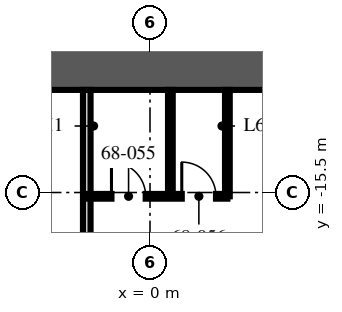
"""IFC4 building model, lengths in metres.
Left out: names, types, materials, properties, quantities, classifications, styles, units other than length and angle.
Written with IfcOpenShell. Run it as: python <this file> out.ifc"""

import sys

from ifc_helpers import new_model, si_unit, direction, frame, frame_2d, origin, place, context, subcontext, project, spatial, rectangle, extrude, element, fill, save


model = new_model("IFC4")
c1 = context("Model", 3, precision=1e-05, world=origin(), true_north=direction((0.0, 1.0)))
c2 = subcontext(c1, "Body", "Model", "MODEL_VIEW")
j1 = project(units=[si_unit("LENGTHUNIT", "METRE"), si_unit("PLANEANGLEUNIT", "RADIAN")], contexts=[c1])
p1 = place(None, origin())
s1 = spatial("IfcSite", under=j1, at=p1, CompositionType="ELEMENT")
p2 = place(p1, origin())
s2 = spatial("IfcBuilding", under=s1, at=p2, CompositionType="ELEMENT")
p3 = place(p2, frame((0.0, 0.0, 270.75)))
s3 = spatial("IfcBuildingStorey", under=s2, at=p3, CompositionType="ELEMENT", Elevation=270.75)
p4 = place(p3, frame((-15.5, -12.0, -0.25), z_axis=(0.0, 0.0, 1.0), x_axis=(1.0, 0.0, 0.0)))
e1 = element("IfcWall", 1, at=p4, inside=s3, PredefinedType="SHEAR", context=c2, shape_type="SweptSolid", body=[
    extrude(rectangle(XDim=31.0, YDim=1.6, at=frame_2d((15.5, 0.0))), origin(), (0.0, 0.0, 1.0), 3.75),
])
p5 = place(p3, frame((-1.664, -12.8, 0.0), z_axis=(0.0, 0.0, 1.0), x_axis=(0.0, -1.0, 0.0)))
e2 = element("IfcWall", 2, at=p5, inside=s3, PredefinedType="PARTITIONING", context=c2, shape_type="SweptSolid", body=[
    extrude(rectangle(XDim=12.65, YDim=0.2, at=frame_2d((6.325, 0.0))), origin(), (0.0, 0.0, 1.0), 2.81),
])
p6 = place(p3, frame((-1.664, -15.6, 0.0), z_axis=(0.0, 0.0, 1.0), x_axis=(1.0, 0.0, 0.0)))
e3 = element("IfcWall", 3, at=p6, inside=s3, PredefinedType="PARTITIONING", context=c2, shape_type="SweptSolid", body=[
    extrude(rectangle(XDim=3.7, YDim=0.125, at=frame_2d((1.85, 0.0))), origin(), (0.0, 0.0, 1.0), 2.6),
])
p7 = place(p6, frame((0.65, 0.0, 0.0)))
e4 = element("IfcOpeningElement", 4, at=p7, cuts=e3, PredefinedType="OPENING", context=c2, shape_type="SweptSolid", body=[
    extrude(rectangle(XDim=0.9, YDim=2.1, at=frame_2d((0.45, 1.05))), frame((0.0, 0.073, 0.0), z_axis=(0.0, -1.0, 0.0), x_axis=(1.0, 0.0, 0.0)), (0.0, 0.0, 1.0), 0.145),
])
p8 = place(p6, frame((2.5, 0.0, 0.0)))
e5 = element("IfcOpeningElement", 5, at=p8, cuts=e3, PredefinedType="OPENING", context=c2, shape_type="SweptSolid", body=[
    extrude(rectangle(XDim=0.9, YDim=2.1, at=frame_2d((0.45, 1.05))), frame((0.0, 0.073, 0.0), z_axis=(0.0, -1.0, 0.0), x_axis=(1.0, 0.0, 0.0)), (0.0, 0.0, 1.0), 0.145),
])
for number, where, z_axis, x_axis in (
    (6, (0.536, -12.8, 0.0), (0.0, 0.0, 1.0), (0.0, -1.0, 0.0)),
    (7, (2.036, -12.8, 0.0), (0.0, 0.0, 1.0), (0.0, -1.0, 0.0)),
):
    element("IfcWall", number, at=place(p3, frame(where, z_axis=z_axis, x_axis=x_axis)), inside=s3, PredefinedType="PARTITIONING", context=c2, shape_type="SweptSolid", body=[
        extrude(rectangle(XDim=2.8, YDim=0.125, at=frame_2d((1.4, 0.0))), origin(), (0.0, 0.0, 1.0), 3.5),
    ])
p9 = place(p7, origin())
e8 = element("IfcDoor", 8, at=p9, inside=s3, OperationType="SINGLE_SWING_LEFT", PredefinedType="DOOR", context=c2, shape_type="SweptSolid", body=[
    extrude(rectangle(XDim=0.9, YDim=2.1, at=frame_2d((0.45, 1.05))), frame((0.0, 0.025, 0.0), z_axis=(0.0, -1.0, 0.0), x_axis=(1.0, 0.0, 0.0)), (0.0, 0.0, 1.0), 0.05),
])
fill(e4, e8)
p10 = place(p8, origin())
e9 = element("IfcDoor", 9, at=p10, inside=s3, OperationType="SINGLE_SWING_LEFT", PredefinedType="DOOR", context=c2, shape_type="SweptSolid", body=[
    extrude(rectangle(XDim=0.9, YDim=2.1, at=frame_2d((0.45, 1.05))), frame((0.0, 0.025, 0.0), z_axis=(0.0, -1.0, 0.0), x_axis=(1.0, 0.0, 0.0)), (0.0, 0.0, 1.0), 0.05),
])
fill(e5, e9)
save(model, sys.argv[1])
